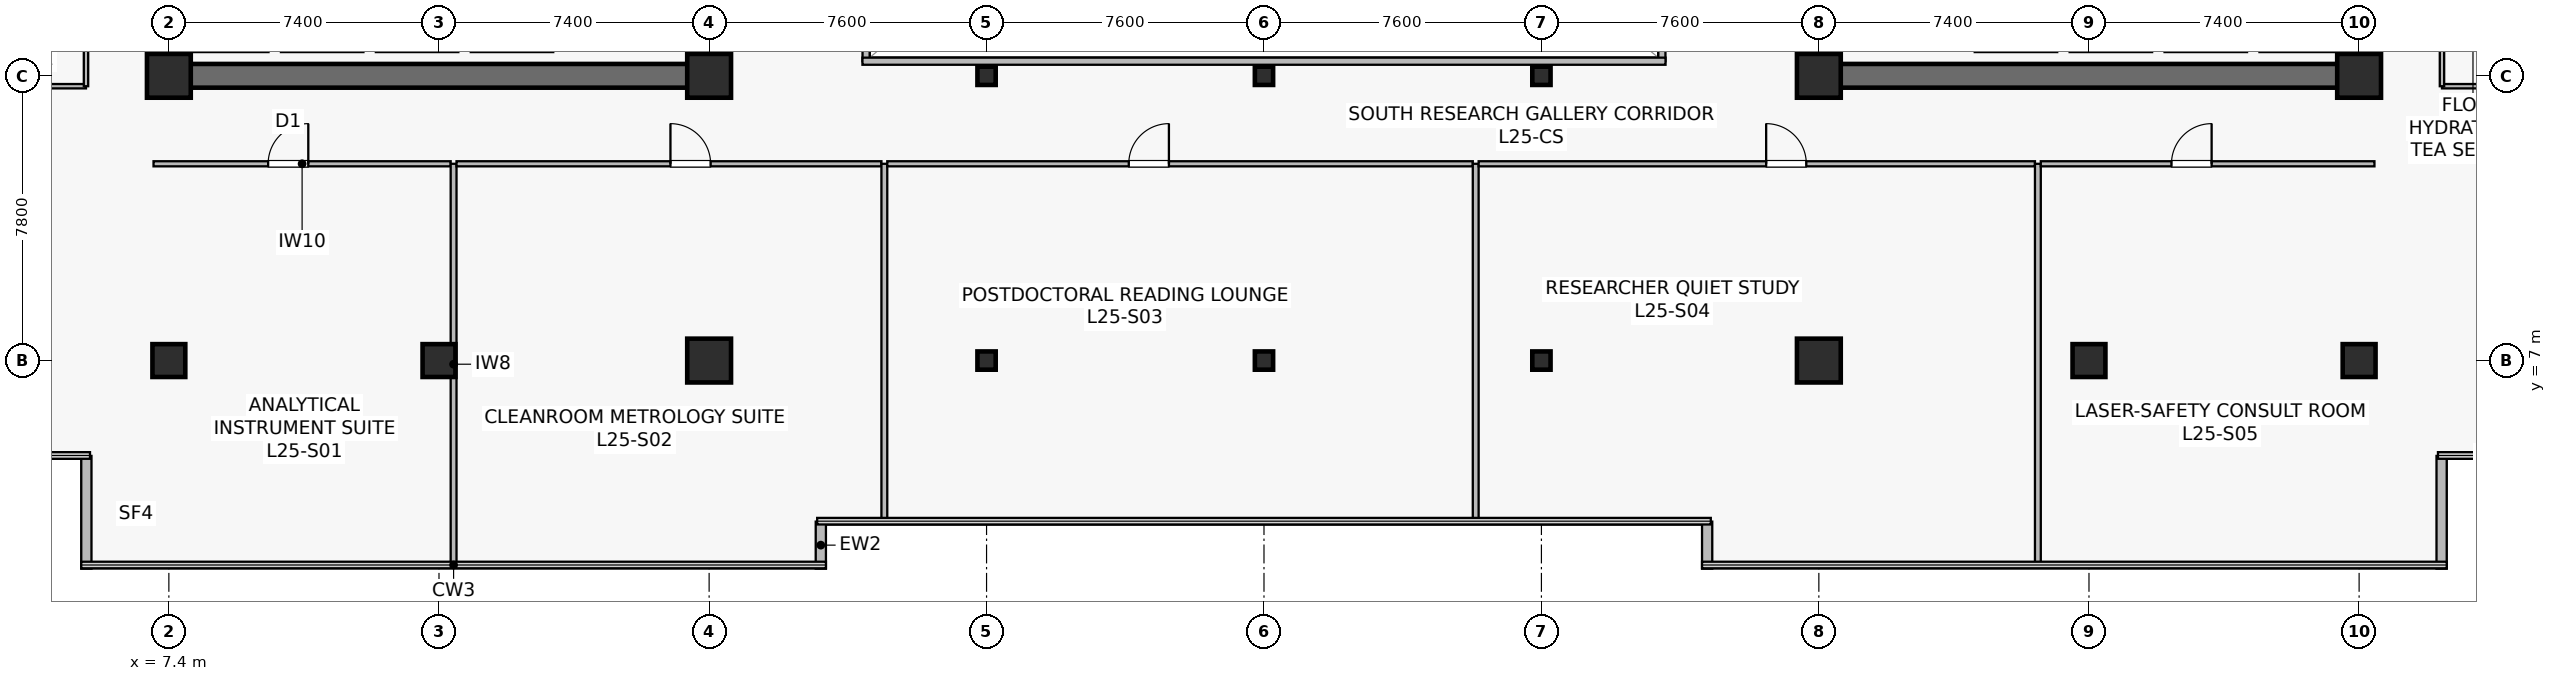
"""IFC4 building model, lengths in metres.
Left out: names, types, materials, properties, quantities, classifications, styles, units other than length and angle.
Written with IfcOpenShell. Run it as: python <this file> out.ifc"""

import sys

from ifc_helpers import new_model, si_unit, direction, frame, frame_2d, origin, origin_2d, place, context, subcontext, project, spatial, rectangle, hollow_rectangle, extrude, source, transform, mapped, element, fill, save


model = new_model("IFC4")
c1 = context("Model", 3, precision=1e-05, world=origin(), true_north=direction((0.0, 1.0)))
c2 = subcontext(c1, "Body", "Model", "MODEL_VIEW")
j1 = project(units=[si_unit("LENGTHUNIT", "METRE"), si_unit("PLANEANGLEUNIT", "RADIAN")], contexts=[c1])
p1 = place(None, origin())
s1 = spatial("IfcSite", under=j1, at=p1, CompositionType="ELEMENT")
p2 = place(p1, origin())
s2 = spatial("IfcBuilding", under=s1, at=p2, CompositionType="ELEMENT")
p3 = place(p2, frame((0.0, 0.0, 105.1)))
s3 = spatial("IfcBuildingStorey", under=s2, at=p3, CompositionType="ELEMENT", Elevation=105.1)
p4 = place(p3, frame((7.075, 14.8, 0.0), z_axis=(0.0, 0.0, 1.0), x_axis=(1.0, 0.0, 0.0)))
e1 = element("IfcWall", 1, at=p4, inside=s3, PredefinedType="SHEAR", context=c2, shape_type="SweptSolid", body=[
    extrude(rectangle(XDim=15.45, YDim=0.65, at=frame_2d((7.725, 0.0))), origin(), (0.0, 0.0, 1.0), 3.79),
])
p5 = place(p3, frame((7.4, 15.125, 0.0), z_axis=(0.0, 0.0, 1.0), x_axis=(0.0, 1.0, 0.0)))
e2 = element("IfcWall", 2, at=p5, inside=s3, PredefinedType="SHEAR", context=c2, shape_type="SweptSolid", body=[
    extrude(rectangle(XDim=18.35, YDim=0.65, at=frame_2d((9.175, 0.0))), origin(), (0.0, 0.0, 1.0), 3.79),
])
p6 = place(p3, frame((22.2, 15.125, 0.0), z_axis=(0.0, 0.0, 1.0), x_axis=(0.0, 1.0, 0.0)))
e3 = element("IfcWall", 3, at=p6, inside=s3, PredefinedType="SHEAR", context=c2, shape_type="SweptSolid", body=[
    extrude(rectangle(XDim=18.35, YDim=0.65, at=frame_2d((9.175, 0.0))), origin(), (0.0, 0.0, 1.0), 3.79),
])
p7 = place(p6, frame((3.425, 0.0, 0.0)))
e4 = element("IfcOpeningElement", 4, at=p7, cuts=e3, PredefinedType="OPENING", context=c2, shape_type="SweptSolid", body=[
    extrude(rectangle(XDim=1.42, YDim=2.2, at=frame_2d((0.71, 1.1))), frame((0.0, 0.335, 0.0), z_axis=(0.0, -1.0, 0.0), x_axis=(1.0, 0.0, 0.0)), (0.0, 0.0, 1.0), 0.67),
])
p8 = place(p3, frame((52.275, 14.8, 0.0), z_axis=(0.0, 0.0, 1.0), x_axis=(1.0, 0.0, 0.0)))
e5 = element("IfcWall", 5, at=p8, inside=s3, PredefinedType="SHEAR", context=c2, shape_type="SweptSolid", body=[
    extrude(rectangle(XDim=15.45, YDim=0.65, at=frame_2d((7.725, 0.0))), origin(), (0.0, 0.0, 1.0), 3.79),
])
p9 = place(p3, frame((52.6, 15.125, 0.0), z_axis=(0.0, 0.0, 1.0), x_axis=(0.0, 1.0, 0.0)))
e6 = element("IfcWall", 6, at=p9, inside=s3, PredefinedType="SHEAR", context=c2, shape_type="SweptSolid", body=[
    extrude(rectangle(XDim=18.35, YDim=0.65, at=frame_2d((9.175, 0.0))), origin(), (0.0, 0.0, 1.0), 3.79),
])
p10 = place(p9, frame((3.425, 0.0, 0.0)))
e7 = element("IfcOpeningElement", 7, at=p10, cuts=e6, PredefinedType="OPENING", context=c2, shape_type="SweptSolid", body=[
    extrude(rectangle(XDim=1.42, YDim=2.2, at=frame_2d((0.71, 1.1))), frame((0.0, 0.335, 0.0), z_axis=(0.0, -1.0, 0.0), x_axis=(1.0, 0.0, 0.0)), (0.0, 0.0, 1.0), 0.67),
])
p11 = place(p3, frame((67.4, 15.125, 0.0), z_axis=(0.0, 0.0, 1.0), x_axis=(0.0, 1.0, 0.0)))
e8 = element("IfcWall", 8, at=p11, inside=s3, PredefinedType="SHEAR", context=c2, shape_type="SweptSolid", body=[
    extrude(rectangle(XDim=18.35, YDim=0.65, at=frame_2d((9.175, 0.0))), origin(), (0.0, 0.0, 1.0), 3.79),
])
m1 = source(origin(), c2, "Body", "SweptSolid", [
    extrude(rectangle(XDim=0.9, YDim=0.9, at=origin_2d()), origin(), (0.0, 0.0, 1.0), 4.1),
])
p12 = place(p3, frame((14.8, 7.0, 0.0), z_axis=(0.0, 0.0, 1.0), x_axis=(1.0, 0.0, 0.0)))
e9 = element("IfcColumn", 9, at=p12, inside=s3, PredefinedType="COLUMN", context=c2, shape_type="MappedRepresentation", body=[
    mapped(m1, transform((0.0, 0.0, 0.0), scale=1.0)),
])
m2 = source(origin(), c2, "Body", "SweptSolid", [
    extrude(rectangle(XDim=1.2, YDim=1.2, at=origin_2d()), origin(), (0.0, 0.0, 1.0), 4.1),
])
for number, where, z_axis, x_axis in (
    (10, (22.2, 7.0, 0.0), (0.0, 0.0, 1.0), (1.0, 0.0, 0.0)),
    (11, (7.4, 14.8, 0.0), (0.0, 0.0, 1.0), (1.0, 0.0, 0.0)),
    (12, (22.2, 14.8, 0.0), (0.0, 0.0, 1.0), (1.0, 0.0, 0.0)),
    (13, (52.6, 7.0, 0.0), (0.0, 0.0, 1.0), (1.0, 0.0, 0.0)),
):
    element("IfcColumn", number, at=place(p3, frame(where, z_axis=z_axis, x_axis=x_axis)), inside=s3, PredefinedType="COLUMN", context=c2, shape_type="MappedRepresentation", body=[
        mapped(m2, transform((0.0, 0.0, 0.0), scale=1.0)),
    ])
p13 = place(p3, frame((60.0, 7.0, 0.0), z_axis=(0.0, 0.0, 1.0), x_axis=(1.0, 0.0, 0.0)))
e14 = element("IfcColumn", 14, at=p13, inside=s3, PredefinedType="COLUMN", context=c2, shape_type="MappedRepresentation", body=[
    mapped(m1, transform((0.0, 0.0, 0.0), scale=1.0)),
])
for number, where, z_axis, x_axis in (
    (15, (52.6, 14.8, 0.0), (0.0, 0.0, 1.0), (1.0, 0.0, 0.0)),
    (16, (67.4, 14.8, 0.0), (0.0, 0.0, 1.0), (1.0, 0.0, 0.0)),
):
    element("IfcColumn", number, at=place(p3, frame(where, z_axis=z_axis, x_axis=x_axis)), inside=s3, PredefinedType="COLUMN", context=c2, shape_type="MappedRepresentation", body=[
        mapped(m2, transform((0.0, 0.0, 0.0), scale=1.0)),
    ])
for number, where, z_axis, x_axis in (
    (17, (7.4, 7.0, 0.0), (0.0, 0.0, 1.0), (1.0, 0.0, 0.0)),
    (18, (67.4, 7.0, 0.0), (0.0, 0.0, 1.0), (1.0, 0.0, 0.0)),
):
    element("IfcColumn", number, at=place(p3, frame(where, z_axis=z_axis, x_axis=x_axis)), inside=s3, PredefinedType="COLUMN", context=c2, shape_type="MappedRepresentation", body=[
        mapped(m1, transform((0.0, 0.0, 0.0), scale=1.0)),
    ])
m3 = source(origin(), c2, "Body", "SweptSolid", [
    extrude(hollow_rectangle(XDim=0.5, YDim=0.5, WallThickness=0.022, at=origin_2d()), origin(), (0.0, 0.0, 1.0), 4.1),
])
for number, where, z_axis, x_axis in (
    (19, (29.8, 7.0, 0.0), (0.0, 0.0, 1.0), (1.0, 0.0, 0.0)),
    (20, (29.8, 14.8, 0.0), (0.0, 0.0, 1.0), (1.0, 0.0, 0.0)),
    (21, (37.4, 7.0, 0.0), (0.0, 0.0, 1.0), (1.0, 0.0, 0.0)),
    (22, (37.4, 14.8, 0.0), (0.0, 0.0, 1.0), (1.0, 0.0, 0.0)),
    (23, (45.0, 7.0, 0.0), (0.0, 0.0, 1.0), (1.0, 0.0, 0.0)),
    (24, (45.0, 14.8, 0.0), (0.0, 0.0, 1.0), (1.0, 0.0, 0.0)),
):
    element("IfcColumn", number, at=place(p3, frame(where, z_axis=z_axis, x_axis=x_axis)), inside=s3, PredefinedType="COLUMN", context=c2, shape_type="MappedRepresentation", body=[
        mapped(m3, transform((0.0, 0.0, 0.0), scale=1.0)),
    ])
for number, where, z_axis, x_axis in (
    (25, (25.26, 1.3, 0.0), (0.0, 0.0, 1.0), (0.0, 1.0, 0.0)),
    (26, (49.54, 2.588, 0.0), (0.0, 0.0, 1.0), (0.0, -1.0, 0.0)),
):
    element("IfcWall", number, at=place(p3, frame(where, z_axis=z_axis, x_axis=x_axis)), inside=s3, PredefinedType="STANDARD", context=c2, shape_type="SweptSolid", body=[
        extrude(rectangle(XDim=1.288, YDim=0.28, at=frame_2d((0.644, 0.0))), origin(), (0.0, 0.0, 1.0), 3.79),
    ])
for number, where, z_axis, x_axis in (
    (27, (69.66, 1.3, 0.0), (0.0, 0.0, 1.0), (0.0, 1.0, 0.0)),
    (28, (5.14, 4.388, 0.0), (0.0, 0.0, 1.0), (0.0, -1.0, 0.0)),
):
    element("IfcWall", number, at=place(p3, frame(where, z_axis=z_axis, x_axis=x_axis)), inside=s3, PredefinedType="STANDARD", context=c2, shape_type="SweptSolid", body=[
        extrude(rectangle(XDim=3.088, YDim=0.28, at=frame_2d((1.544, 0.0))), origin(), (0.0, 0.0, 1.0), 3.79),
    ])
p14 = place(p3, frame((7.87, 15.55, 0.0), z_axis=(0.0, 0.0, 1.0), x_axis=(1.0, 0.0, 0.0)))
e29 = element("IfcWall", 29, at=p14, inside=s3, PredefinedType="SOLIDWALL", context=c2, shape_type="SweptSolid", body=[
    extrude(rectangle(XDim=2.26, YDim=0.2, at=frame_2d((1.13, 0.0))), origin(), (0.0, 0.0, 1.0), 3.79),
])
p15 = place(p3, frame((10.47, 15.55, 0.0), z_axis=(0.0, 0.0, 1.0), x_axis=(1.0, 0.0, 0.0)))
e30 = element("IfcWall", 30, at=p15, inside=s3, PredefinedType="SOLIDWALL", context=c2, shape_type="SweptSolid", body=[
    extrude(rectangle(XDim=2.26, YDim=0.2, at=frame_2d((1.13, 0.0))), origin(), (0.0, 0.0, 1.0), 3.79),
])
p16 = place(p3, frame((13.07, 15.55, 0.0), z_axis=(0.0, 0.0, 1.0), x_axis=(1.0, 0.0, 0.0)))
e31 = element("IfcWall", 31, at=p16, inside=s3, PredefinedType="SOLIDWALL", context=c2, shape_type="SweptSolid", body=[
    extrude(rectangle(XDim=2.26, YDim=0.2, at=frame_2d((1.13, 0.0))), origin(), (0.0, 0.0, 1.0), 3.125),
])
for number, where, z_axis, x_axis in (
    (32, (15.67, 15.55, 0.0), (0.0, 0.0, 1.0), (1.0, 0.0, 0.0)),
    (33, (64.67, 15.55, 0.0), (0.0, 0.0, 1.0), (1.0, 0.0, 0.0)),
    (34, (62.07, 15.55, 0.0), (0.0, 0.0, 1.0), (1.0, 0.0, 0.0)),
):
    element("IfcWall", number, at=place(p3, frame(where, z_axis=z_axis, x_axis=x_axis)), inside=s3, PredefinedType="SOLIDWALL", context=c2, shape_type="SweptSolid", body=[
        extrude(rectangle(XDim=2.26, YDim=0.2, at=frame_2d((1.13, 0.0))), origin(), (0.0, 0.0, 1.0), 3.79),
    ])
p17 = place(p3, frame((59.47, 15.55, 0.0), z_axis=(0.0, 0.0, 1.0), x_axis=(1.0, 0.0, 0.0)))
e35 = element("IfcWall", 35, at=p17, inside=s3, PredefinedType="SOLIDWALL", context=c2, shape_type="SweptSolid", body=[
    extrude(rectangle(XDim=2.26, YDim=0.2, at=frame_2d((1.13, 0.0))), origin(), (0.0, 0.0, 1.0), 3.125),
])
p18 = place(p3, frame((56.87, 15.55, 0.0), z_axis=(0.0, 0.0, 1.0), x_axis=(1.0, 0.0, 0.0)))
e36 = element("IfcWall", 36, at=p18, inside=s3, PredefinedType="SOLIDWALL", context=c2, shape_type="SweptSolid", body=[
    extrude(rectangle(XDim=2.26, YDim=0.2, at=frame_2d((1.13, 0.0))), origin(), (0.0, 0.0, 1.0), 3.79),
])
p19 = place(p3, frame((26.5, 15.2, 0.0), z_axis=(0.0, 0.0, 1.0), x_axis=(0.0, 1.0, 0.0)))
e37 = element("IfcWall", 37, at=p19, inside=s3, PredefinedType="SOLIDWALL", context=c2, shape_type="SweptSolid", body=[
    extrude(rectangle(XDim=18.2, YDim=0.195, at=frame_2d((9.1, 0.0))), origin(), (0.0, 0.0, 1.0), 3.79),
])
p20 = place(p19, frame((1.8, 0.0, 0.9)))
e38 = element("IfcOpeningElement", 38, at=p20, cuts=e37, PredefinedType="OPENING", context=c2, shape_type="SweptSolid", body=[
    extrude(rectangle(XDim=1.2, YDim=1.35, at=frame_2d((0.6, 0.675))), frame((0.0, 0.107, 0.0), z_axis=(0.0, -1.0, 0.0), x_axis=(1.0, 0.0, 0.0)), (0.0, 0.0, 1.0), 0.215),
])
p21 = place(p19, frame((13.2, 0.0, 0.9)))
e39 = element("IfcOpeningElement", 39, at=p21, cuts=e37, PredefinedType="OPENING", context=c2, shape_type="SweptSolid", body=[
    extrude(rectangle(XDim=1.2, YDim=1.35, at=frame_2d((0.6, 0.675))), frame((0.0, 0.107, 0.0), z_axis=(0.0, -1.0, 0.0), x_axis=(1.0, 0.0, 0.0)), (0.0, 0.0, 1.0), 0.215),
])
p22 = place(p3, frame((48.3, 15.2, 0.0), z_axis=(0.0, 0.0, 1.0), x_axis=(0.0, 1.0, 0.0)))
e40 = element("IfcWall", 40, at=p22, inside=s3, PredefinedType="SOLIDWALL", context=c2, shape_type="SweptSolid", body=[
    extrude(rectangle(XDim=18.2, YDim=0.195, at=frame_2d((9.1, 0.0))), origin(), (0.0, 0.0, 1.0), 3.79),
])
p23 = place(p22, frame((1.8, 0.0, 0.9)))
e41 = element("IfcOpeningElement", 41, at=p23, cuts=e40, PredefinedType="OPENING", context=c2, shape_type="SweptSolid", body=[
    extrude(rectangle(XDim=1.2, YDim=1.35, at=frame_2d((0.6, 0.675))), frame((0.0, 0.107, 0.0), z_axis=(0.0, -1.0, 0.0), x_axis=(1.0, 0.0, 0.0)), (0.0, 0.0, 1.0), 0.215),
])
p24 = place(p22, frame((13.2, 0.0, 0.9)))
e42 = element("IfcOpeningElement", 42, at=p24, cuts=e40, PredefinedType="OPENING", context=c2, shape_type="SweptSolid", body=[
    extrude(rectangle(XDim=1.2, YDim=1.35, at=frame_2d((0.6, 0.675))), frame((0.0, 0.107, 0.0), z_axis=(0.0, -1.0, 0.0), x_axis=(1.0, 0.0, 0.0)), (0.0, 0.0, 1.0), 0.215),
])
p25 = place(p3, frame((26.4, 15.2, 0.0), z_axis=(0.0, 0.0, 1.0), x_axis=(1.0, 0.0, 0.0)))
e43 = element("IfcWall", 43, at=p25, inside=s3, PredefinedType="SOLIDWALL", context=c2, shape_type="SweptSolid", body=[
    extrude(rectangle(XDim=22.0, YDim=0.195, at=frame_2d((11.0, 0.0))), origin(), (0.0, 0.0, 1.0), 3.79),
])
p26 = place(p3, frame((6.98, 12.39, 0.0), z_axis=(0.0, 0.0, 1.0), x_axis=(1.0, 0.0, 0.0)))
e44 = element("IfcWall", 44, at=p26, inside=s3, PredefinedType="PARTITIONING", context=c2, shape_type="SweptSolid", body=[
    extrude(rectangle(XDim=8.14, YDim=0.14, at=frame_2d((4.07, 0.0))), origin(), (0.0, 0.0, 1.0), 3.125),
])
p27 = place(p26, frame((3.14, 0.0, 0.0)))
e45 = element("IfcOpeningElement", 45, at=p27, cuts=e44, PredefinedType="OPENING", context=c2, shape_type="SweptSolid", body=[
    extrude(rectangle(XDim=1.1, YDim=2.18, at=frame_2d((0.55, 1.09))), frame((0.0, 0.08, 0.0), z_axis=(0.0, -1.0, 0.0), x_axis=(1.0, 0.0, 0.0)), (0.0, 0.0, 1.0), 0.16),
])
p28 = place(p3, frame((15.2, 1.41, 0.0), z_axis=(0.0, 0.0, 1.0), x_axis=(0.0, 1.0, 0.0)))
e46 = element("IfcWall", 46, at=p28, inside=s3, PredefinedType="PARTITIONING", context=c2, shape_type="SweptSolid", body=[
    extrude(rectangle(XDim=10.98, YDim=0.16, at=frame_2d((5.49, 0.0))), origin(), (0.0, 0.0, 1.0), 3.075),
])
p29 = place(p3, frame((15.28, 12.39, 0.0), z_axis=(0.0, 0.0, 1.0), x_axis=(1.0, 0.0, 0.0)))
e47 = element("IfcWall", 47, at=p29, inside=s3, PredefinedType="PARTITIONING", context=c2, shape_type="SweptSolid", body=[
    extrude(rectangle(XDim=11.64, YDim=0.14, at=frame_2d((5.82, 0.0))), origin(), (0.0, 0.0, 1.0), 3.125),
])
p30 = place(p29, frame((5.86, 0.0, 0.0)))
e48 = element("IfcOpeningElement", 48, at=p30, cuts=e47, PredefinedType="OPENING", context=c2, shape_type="SweptSolid", body=[
    extrude(rectangle(XDim=1.1, YDim=2.18, at=frame_2d((0.55, 1.09))), frame((0.0, 0.08, 0.0), z_axis=(0.0, -1.0, 0.0), x_axis=(1.0, 0.0, 0.0)), (0.0, 0.0, 1.0), 0.16),
])
p31 = place(p3, frame((27.0, 2.61, 0.0), z_axis=(0.0, 0.0, 1.0), x_axis=(0.0, 1.0, 0.0)))
e49 = element("IfcWall", 49, at=p31, inside=s3, PredefinedType="PARTITIONING", context=c2, shape_type="SweptSolid", body=[
    extrude(rectangle(XDim=9.78, YDim=0.16, at=frame_2d((4.89, 0.0))), origin(), (0.0, 0.0, 1.0), 3.075),
])
p32 = place(p3, frame((27.08, 12.39, 0.0), z_axis=(0.0, 0.0, 1.0), x_axis=(1.0, 0.0, 0.0)))
e50 = element("IfcWall", 50, at=p32, inside=s3, PredefinedType="PARTITIONING", context=c2, shape_type="SweptSolid", body=[
    extrude(rectangle(XDim=16.04, YDim=0.14, at=frame_2d((8.02, 0.0))), origin(), (0.0, 0.0, 1.0), 3.125),
])
p33 = place(p32, frame((6.615, 0.0, 0.0)))
e51 = element("IfcOpeningElement", 51, at=p33, cuts=e50, PredefinedType="OPENING", context=c2, shape_type="SweptSolid", body=[
    extrude(rectangle(XDim=1.1, YDim=2.18, at=frame_2d((0.55, 1.09))), frame((0.0, 0.08, 0.0), z_axis=(0.0, -1.0, 0.0), x_axis=(1.0, 0.0, 0.0)), (0.0, 0.0, 1.0), 0.16),
])
p34 = place(p3, frame((43.2, 2.61, 0.0), z_axis=(0.0, 0.0, 1.0), x_axis=(0.0, 1.0, 0.0)))
e52 = element("IfcWall", 52, at=p34, inside=s3, PredefinedType="PARTITIONING", context=c2, shape_type="SweptSolid", body=[
    extrude(rectangle(XDim=9.78, YDim=0.16, at=frame_2d((4.89, 0.0))), origin(), (0.0, 0.0, 1.0), 3.075),
])
p35 = place(p3, frame((43.28, 12.39, 0.0), z_axis=(0.0, 0.0, 1.0), x_axis=(1.0, 0.0, 0.0)))
e53 = element("IfcWall", 53, at=p35, inside=s3, PredefinedType="PARTITIONING", context=c2, shape_type="SweptSolid", body=[
    extrude(rectangle(XDim=15.24, YDim=0.14, at=frame_2d((7.62, 0.0))), origin(), (0.0, 0.0, 1.0), 3.125),
])
p36 = place(p35, frame((7.876, 0.0, 0.0)))
e54 = element("IfcOpeningElement", 54, at=p36, cuts=e53, PredefinedType="OPENING", context=c2, shape_type="SweptSolid", body=[
    extrude(rectangle(XDim=1.1, YDim=2.18, at=frame_2d((0.55, 1.09))), frame((0.0, 0.08, 0.0), z_axis=(0.0, -1.0, 0.0), x_axis=(1.0, 0.0, 0.0)), (0.0, 0.0, 1.0), 0.16),
])
p37 = place(p3, frame((58.6, 1.41, 0.0), z_axis=(0.0, 0.0, 1.0), x_axis=(0.0, 1.0, 0.0)))
e55 = element("IfcWall", 55, at=p37, inside=s3, PredefinedType="PARTITIONING", context=c2, shape_type="SweptSolid", body=[
    extrude(rectangle(XDim=10.98, YDim=0.16, at=frame_2d((5.49, 0.0))), origin(), (0.0, 0.0, 1.0), 3.075),
])
p38 = place(p3, frame((58.68, 12.39, 0.0), z_axis=(0.0, 0.0, 1.0), x_axis=(1.0, 0.0, 0.0)))
e56 = element("IfcWall", 56, at=p38, inside=s3, PredefinedType="PARTITIONING", context=c2, shape_type="SweptSolid", body=[
    extrude(rectangle(XDim=9.14, YDim=0.14, at=frame_2d((4.57, 0.0))), origin(), (0.0, 0.0, 1.0), 3.125),
])
p39 = place(p38, frame((3.58, 0.0, 0.0)))
e57 = element("IfcOpeningElement", 57, at=p39, cuts=e56, PredefinedType="OPENING", context=c2, shape_type="SweptSolid", body=[
    extrude(rectangle(XDim=1.1, YDim=2.18, at=frame_2d((0.55, 1.09))), frame((0.0, 0.08, 0.0), z_axis=(0.0, -1.0, 0.0), x_axis=(1.0, 0.0, 0.0)), (0.0, 0.0, 1.0), 0.16),
])
p40 = place(p3, frame((2.11, 14.515, 0.0), z_axis=(0.0, 0.0, 1.0), x_axis=(1.0, 0.0, 0.0)))
e58 = element("IfcWall", 58, at=p40, inside=s3, PredefinedType="PARTITIONING", context=c2, shape_type="SweptSolid", body=[
    extrude(rectangle(XDim=3.02, YDim=0.12, at=frame_2d((1.51, 0.0))), origin(), (0.0, 0.0, 1.0), 3.79),
])
p41 = place(p3, frame((5.13, 14.515, 0.0), z_axis=(0.0, 0.0, 1.0), x_axis=(0.0, 1.0, 0.0)))
e59 = element("IfcWall", 59, at=p41, inside=s3, PredefinedType="PARTITIONING", context=c2, shape_type="SweptSolid", body=[
    extrude(rectangle(XDim=11.625, YDim=0.12, at=frame_2d((5.812, 0.0))), origin(), (0.0, 0.0, 1.0), 3.79),
])
p42 = place(p41, frame((5.363, 0.0, 0.0)))
e60 = element("IfcOpeningElement", 60, at=p42, cuts=e59, PredefinedType="OPENING", context=c2, shape_type="SweptSolid", body=[
    extrude(rectangle(XDim=0.9, YDim=2.1, at=frame_2d((0.45, 1.05))), frame((0.0, 0.07, 0.0), z_axis=(0.0, -1.0, 0.0), x_axis=(1.0, 0.0, 0.0)), (0.0, 0.0, 1.0), 0.14),
])
p43 = place(p3, frame((69.67, 14.515, 0.0), z_axis=(0.0, 0.0, 1.0), x_axis=(1.0, 0.0, 0.0)))
e61 = element("IfcWall", 61, at=p43, inside=s3, PredefinedType="PARTITIONING", context=c2, shape_type="SweptSolid", body=[
    extrude(rectangle(XDim=3.02, YDim=0.12, at=frame_2d((1.51, 0.0))), origin(), (0.0, 0.0, 1.0), 3.79),
])
p44 = place(p3, frame((69.67, 14.515, 0.0), z_axis=(0.0, 0.0, 1.0), x_axis=(0.0, 1.0, 0.0)))
e62 = element("IfcWall", 62, at=p44, inside=s3, PredefinedType="PARTITIONING", context=c2, shape_type="SweptSolid", body=[
    extrude(rectangle(XDim=4.825, YDim=0.12, at=frame_2d((2.413, 0.0))), origin(), (0.0, 0.0, 1.0), 3.79),
])
p45 = place(p44, frame((1.962, 0.0, 0.0)))
e63 = element("IfcOpeningElement", 63, at=p45, cuts=e62, PredefinedType="OPENING", context=c2, shape_type="SweptSolid", body=[
    extrude(rectangle(XDim=0.9, YDim=2.1, at=frame_2d((0.45, 1.05))), frame((0.0, 0.07, 0.0), z_axis=(0.0, -1.0, 0.0), x_axis=(1.0, 0.0, 0.0)), (0.0, 0.0, 1.0), 0.14),
])
m4 = source(origin(), c2, "Body", "SweptSolid", [
    extrude(rectangle(XDim=1.1, YDim=2.18, at=frame_2d((0.55, 1.09))), frame((0.0, 0.025, 0.0), z_axis=(0.0, -1.0, 0.0), x_axis=(1.0, 0.0, 0.0)), (0.0, 0.0, 1.0), 0.05),
])
p46 = place(p27, origin())
e64 = element("IfcDoor", 64, at=p46, inside=s3, OperationType="SINGLE_SWING_RIGHT", PredefinedType="DOOR", context=c2, shape_type="MappedRepresentation", body=[
    mapped(m4, transform((0.0, 0.0, 0.0), scale=1.0)),
])
fill(e45, e64)
p47 = place(p30, origin())
e65 = element("IfcDoor", 65, at=p47, inside=s3, OperationType="SINGLE_SWING_LEFT", PredefinedType="DOOR", context=c2, shape_type="MappedRepresentation", body=[
    mapped(m4, transform((0.0, 0.0, 0.0), scale=1.0)),
])
fill(e48, e65)
p48 = place(p33, origin())
e66 = element("IfcDoor", 66, at=p48, inside=s3, OperationType="SINGLE_SWING_RIGHT", PredefinedType="DOOR", context=c2, shape_type="MappedRepresentation", body=[
    mapped(m4, transform((0.0, 0.0, 0.0), scale=1.0)),
])
fill(e51, e66)
p49 = place(p36, origin())
e67 = element("IfcDoor", 67, at=p49, inside=s3, OperationType="SINGLE_SWING_LEFT", PredefinedType="DOOR", context=c2, shape_type="MappedRepresentation", body=[
    mapped(m4, transform((0.0, 0.0, 0.0), scale=1.0)),
])
fill(e54, e67)
p50 = place(p39, origin())
e68 = element("IfcDoor", 68, at=p50, inside=s3, OperationType="SINGLE_SWING_RIGHT", PredefinedType="DOOR", context=c2, shape_type="MappedRepresentation", body=[
    mapped(m4, transform((0.0, 0.0, 0.0), scale=1.0)),
])
fill(e57, e68)
save(model, sys.argv[1])
